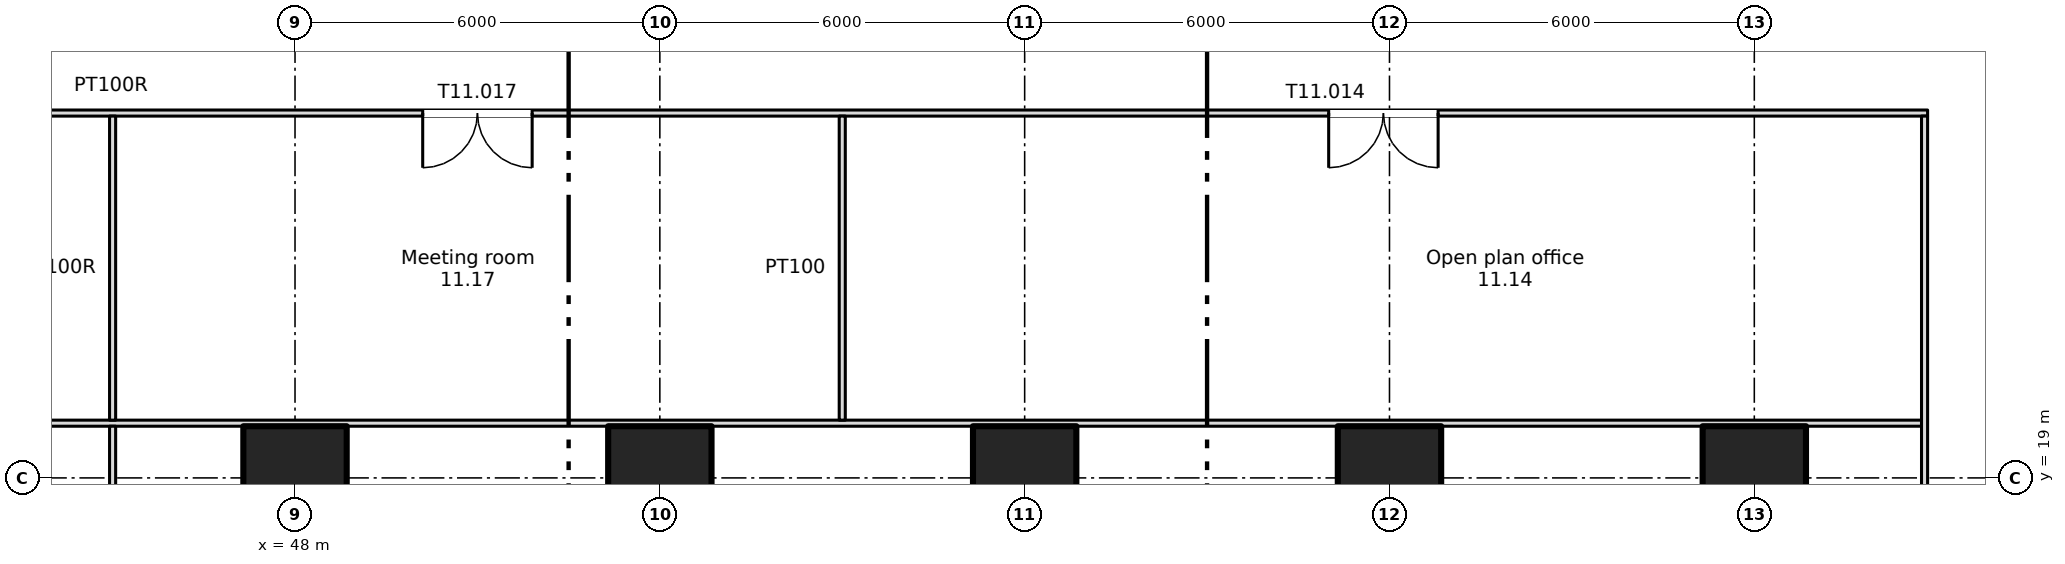
"""IFC4 building model, lengths in metres.
Left out: names, types, materials, properties, quantities, classifications, styles, units other than length and angle.
Written with IfcOpenShell. Run it as: python <this file> out.ifc"""

import sys

from ifc_helpers import new_model, si_unit, direction, frame, frame_2d, origin, origin_2d, place, context, subcontext, project, spatial, rectangle, extrude, element, fill, save


model = new_model("IFC4")
c1 = context("Model", 3, precision=1e-05, world=origin(), true_north=direction((0.0, 1.0)))
c2 = subcontext(c1, "Body", "Model", "MODEL_VIEW")
j1 = project(units=[si_unit("LENGTHUNIT", "METRE"), si_unit("PLANEANGLEUNIT", "RADIAN")], contexts=[c1])
p1 = place(None, origin())
s1 = spatial("IfcSite", under=j1, at=p1, CompositionType="ELEMENT")
p2 = place(p1, origin())
s2 = spatial("IfcBuilding", under=s1, at=p2, CompositionType="ELEMENT")
p3 = place(p2, frame((0.0, 0.0, 52.5)))
s3 = spatial("IfcBuildingStorey", under=s2, at=p3, CompositionType="ELEMENT", Elevation=52.5)
for number, where, z_axis, x_axis in (
    (1, (48.0, 19.0, 0.0), (0.0, 0.0, 1.0), (1.0, 0.0, 0.0)),
    (2, (54.0, 19.0, 0.0), (0.0, 0.0, 1.0), (1.0, 0.0, 0.0)),
    (3, (60.0, 19.0, 0.0), (0.0, 0.0, 1.0), (1.0, 0.0, 0.0)),
    (4, (66.0, 19.0, 0.0), (0.0, 0.0, 1.0), (1.0, 0.0, 0.0)),
    (5, (72.0, 19.0, 0.0), (0.0, 0.0, 1.0), (1.0, 0.0, 0.0)),
):
    element("IfcColumn", number, at=place(p3, frame(where, z_axis=z_axis, x_axis=x_axis)), inside=s3, PredefinedType="COLUMN", context=c2, shape_type="SweptSolid", body=[
        extrude(rectangle(XDim=1.7, YDim=1.7, at=origin_2d()), origin(), (0.0, 0.0, 1.0), 3.35),
    ])
p4 = place(p3, frame((3.25, 19.9, 0.0), z_axis=(0.0, 0.0, 1.0), x_axis=(1.0, 0.0, 0.0)))
e6 = element("IfcWall", 6, at=p4, inside=s3, PredefinedType="PARTITIONING", context=c2, shape_type="SweptSolid", body=[
    extrude(rectangle(XDim=71.5, YDim=0.1, at=frame_2d((35.75, 0.0))), origin(), (0.0, 0.0, 1.0), 3.35),
])
p5 = place(p3, frame((3.15, 25.0, 0.0), z_axis=(0.0, 0.0, 1.0), x_axis=(1.0, 0.0, 0.0)))
e7 = element("IfcWall", 7, at=p5, inside=s3, PredefinedType="PARTITIONING", context=c2, shape_type="SweptSolid", body=[
    extrude(rectangle(XDim=71.7, YDim=0.1, at=frame_2d((35.85, 0.0))), origin(), (0.0, 0.0, 1.0), 3.35),
])
p6 = place(p5, frame((8.05, 0.0, 0.0)))
e8 = element("IfcOpeningElement", 8, at=p6, cuts=e7, PredefinedType="OPENING", context=c2, shape_type="SweptSolid", body=[
    extrude(rectangle(XDim=1.8, YDim=2.1, at=frame_2d((0.9, 1.05))), frame((0.0, 0.06, 0.0), z_axis=(0.0, -1.0, 0.0), x_axis=(1.0, 0.0, 0.0)), (0.0, 0.0, 1.0), 0.12),
])
p7 = place(p5, frame((61.85, 0.0, 0.0)))
e9 = element("IfcOpeningElement", 9, at=p7, cuts=e7, PredefinedType="OPENING", context=c2, shape_type="SweptSolid", body=[
    extrude(rectangle(XDim=1.8, YDim=2.1, at=frame_2d((0.9, 1.05))), frame((0.0, 0.06, 0.0), z_axis=(0.0, -1.0, 0.0), x_axis=(1.0, 0.0, 0.0)), (0.0, 0.0, 1.0), 0.12),
])
p8 = place(p5, frame((22.95, 0.0, 0.0)))
e10 = element("IfcOpeningElement", 10, at=p8, cuts=e7, PredefinedType="OPENING", context=c2, shape_type="SweptSolid", body=[
    extrude(rectangle(XDim=1.8, YDim=2.1, at=frame_2d((0.9, 1.05))), frame((0.0, 0.06, 0.0), z_axis=(0.0, -1.0, 0.0), x_axis=(1.0, 0.0, 0.0)), (0.0, 0.0, 1.0), 0.12),
])
p9 = place(p5, frame((35.35, 0.0, 0.0)))
e11 = element("IfcOpeningElement", 11, at=p9, cuts=e7, PredefinedType="OPENING", context=c2, shape_type="SweptSolid", body=[
    extrude(rectangle(XDim=1.0, YDim=2.1, at=frame_2d((0.5, 1.05))), frame((0.0, 0.06, 0.0), z_axis=(0.0, -1.0, 0.0), x_axis=(1.0, 0.0, 0.0)), (0.0, 0.0, 1.0), 0.12),
])
p10 = place(p5, frame((46.95, 0.0, 0.0)))
e12 = element("IfcOpeningElement", 12, at=p10, cuts=e7, PredefinedType="OPENING", context=c2, shape_type="SweptSolid", body=[
    extrude(rectangle(XDim=1.8, YDim=2.1, at=frame_2d((0.9, 1.05))), frame((0.0, 0.06, 0.0), z_axis=(0.0, -1.0, 0.0), x_axis=(1.0, 0.0, 0.0)), (0.0, 0.0, 1.0), 0.12),
])
p11 = place(p3, frame((45.0, 13.45, 0.0), z_axis=(0.0, 0.0, 1.0), x_axis=(0.0, 1.0, 0.0)))
e13 = element("IfcWall", 13, at=p11, inside=s3, PredefinedType="PARTITIONING", context=c2, shape_type="SweptSolid", body=[
    extrude(rectangle(XDim=6.4, YDim=0.1, at=frame_2d((3.2, 0.0))), origin(), (0.0, 0.0, 1.0), 3.35),
])
for number, where, z_axis, x_axis in (
    (14, (45.0, 19.95, 0.0), (0.0, 0.0, 1.0), (0.0, 1.0, 0.0)),
    (15, (57.0, 19.95, 0.0), (0.0, 0.0, 1.0), (0.0, 1.0, 0.0)),
):
    element("IfcWall", number, at=place(p3, frame(where, z_axis=z_axis, x_axis=x_axis)), inside=s3, PredefinedType="PARTITIONING", context=c2, shape_type="SweptSolid", body=[
        extrude(rectangle(XDim=5.0, YDim=0.1, at=frame_2d((2.5, 0.0))), origin(), (0.0, 0.0, 1.0), 3.35),
    ])
p12 = place(p3, frame((74.8, 13.45, 0.0), z_axis=(0.0, 0.0, 1.0), x_axis=(0.0, 1.0, 0.0)))
e16 = element("IfcWall", 16, at=p12, inside=s3, PredefinedType="PARTITIONING", context=c2, shape_type="SweptSolid", body=[
    extrude(rectangle(XDim=11.5, YDim=0.1, at=frame_2d((5.75, 0.0))), origin(), (0.0, 0.0, 1.0), 3.35),
])
p13 = place(p7, origin())
e17 = element("IfcDoor", 17, at=p13, inside=s3, OperationType="DOUBLE_DOOR_SINGLE_SWING", PredefinedType="DOOR", context=c2, shape_type="SweptSolid", body=[
    extrude(rectangle(XDim=1.8, YDim=2.1, at=frame_2d((0.9, 1.05))), frame((0.0, 0.025, 0.0), z_axis=(0.0, -1.0, 0.0), x_axis=(1.0, 0.0, 0.0)), (0.0, 0.0, 1.0), 0.05),
])
fill(e9, e17)
p14 = place(p10, origin())
e18 = element("IfcDoor", 18, at=p14, inside=s3, OperationType="DOUBLE_DOOR_SINGLE_SWING", PredefinedType="DOOR", context=c2, shape_type="SweptSolid", body=[
    extrude(rectangle(XDim=1.8, YDim=2.1, at=frame_2d((0.9, 1.05))), frame((0.0, 0.025, 0.0), z_axis=(0.0, -1.0, 0.0), x_axis=(1.0, 0.0, 0.0)), (0.0, 0.0, 1.0), 0.05),
])
fill(e12, e18)
save(model, sys.argv[1])
